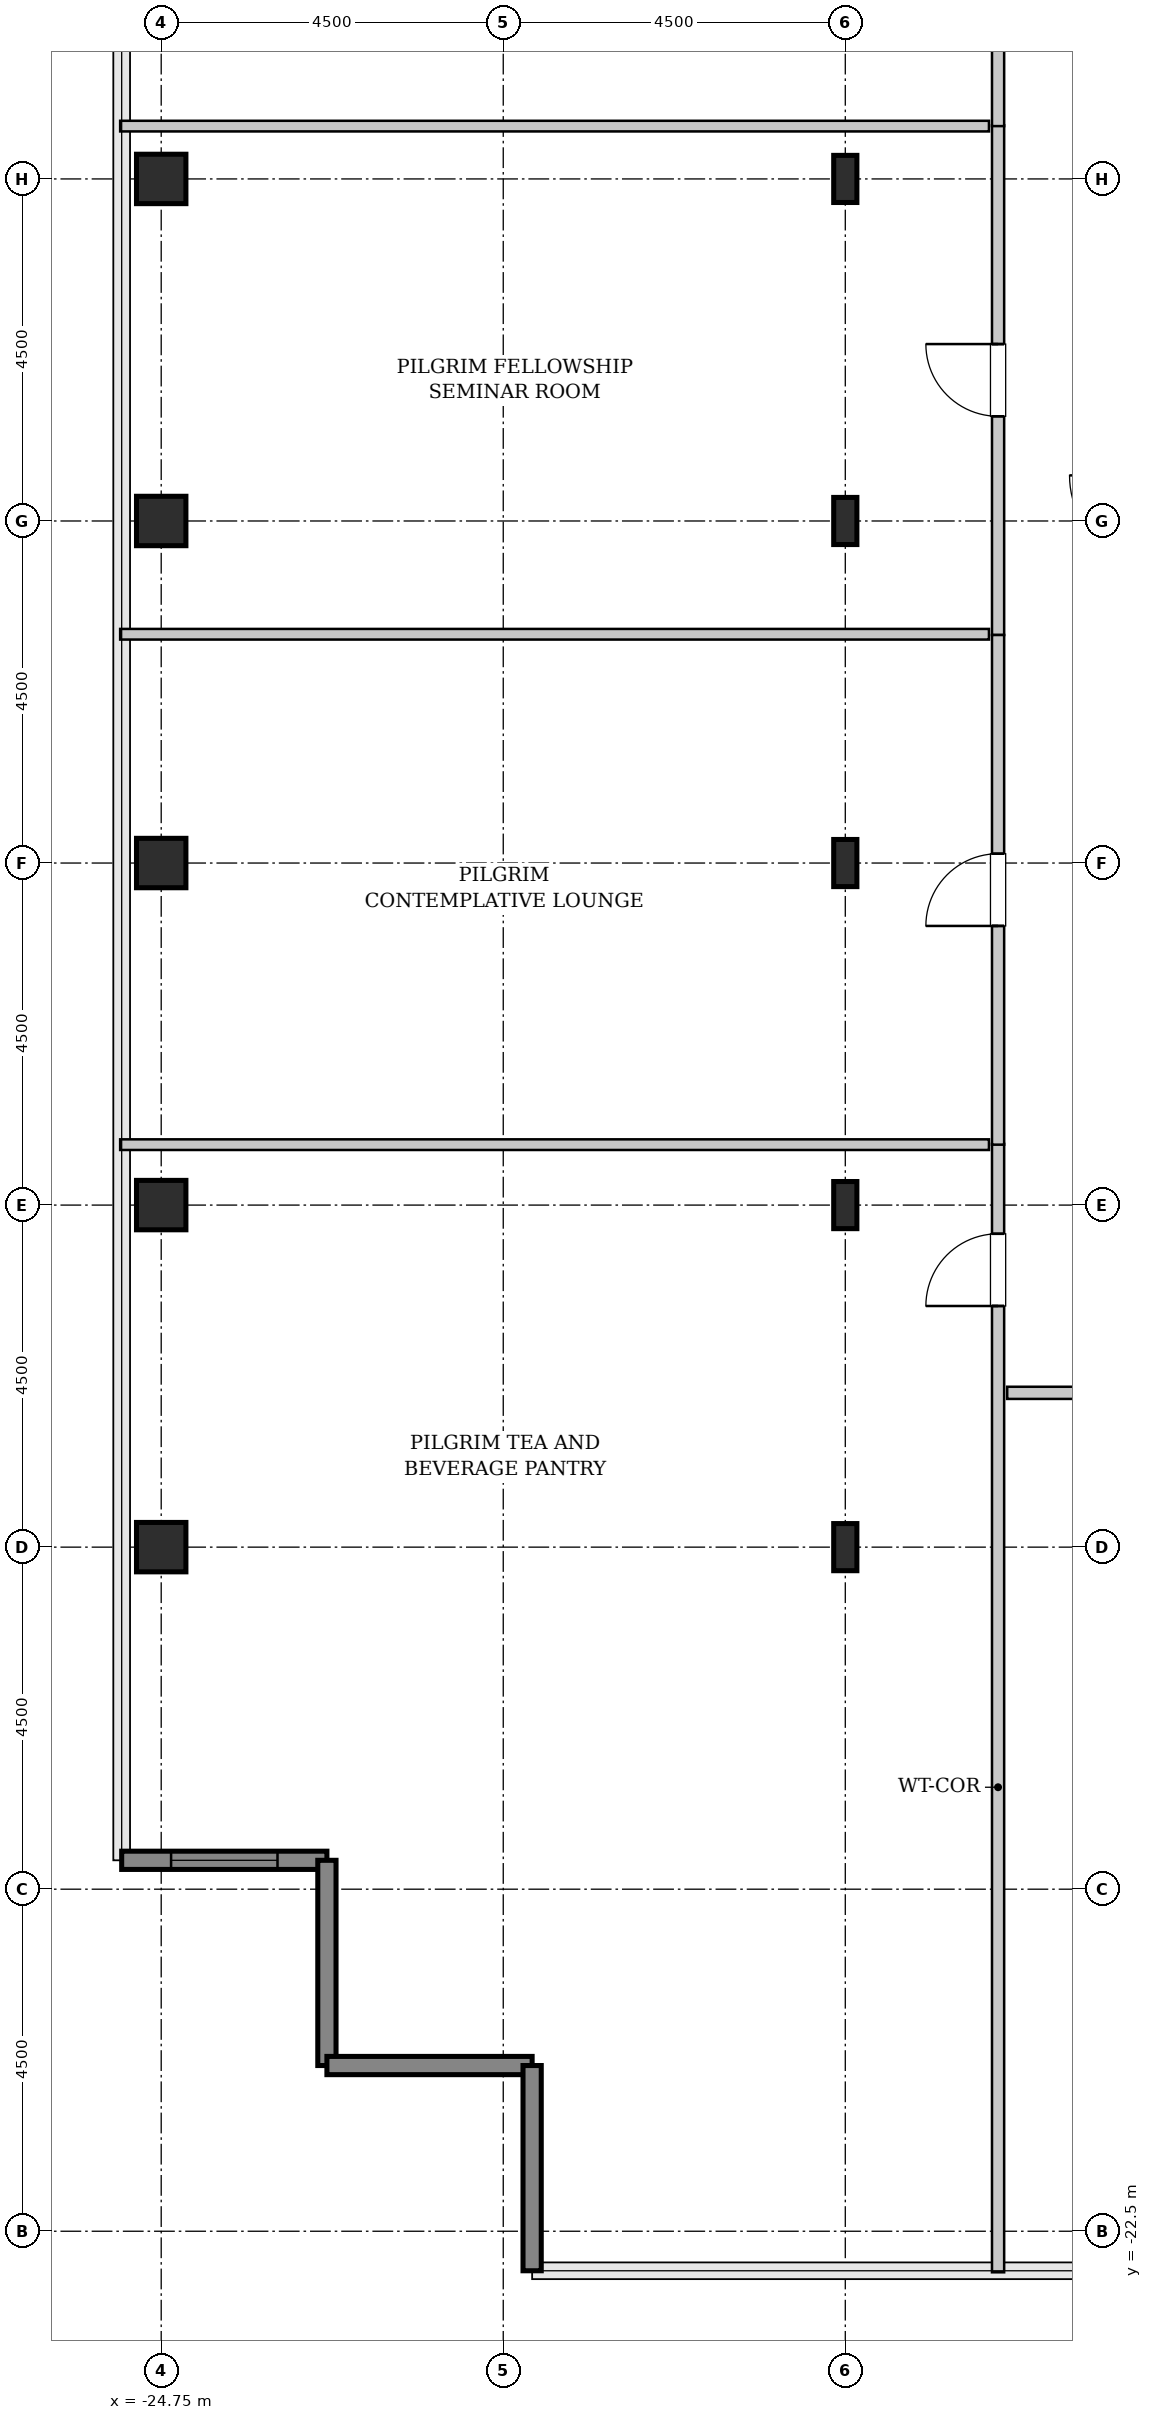
"""IFC4 building model, lengths in metres.
Left out: names, types, materials, properties, quantities, classifications, styles, units other than length and angle.
Written with IfcOpenShell. Run it as: python <this file> out.ifc"""

import sys

from ifc_helpers import new_model, si_unit, direction, frame, frame_2d, origin, origin_2d, place, context, subcontext, project, spatial, rectangle, hollow_rectangle, i_section, extrude, source, transform, mapped, element, fill, save


model = new_model("IFC4")
c1 = context("Model", 3, precision=1e-05, world=origin(), true_north=direction((0.0, 1.0)))
c2 = subcontext(c1, "Body", "Model", "MODEL_VIEW")
j1 = project(units=[si_unit("LENGTHUNIT", "METRE"), si_unit("PLANEANGLEUNIT", "RADIAN")], contexts=[c1])
p1 = place(None, origin())
s1 = spatial("IfcSite", under=j1, at=p1, CompositionType="ELEMENT")
p2 = place(p1, origin())
s2 = spatial("IfcBuilding", under=s1, at=p2, CompositionType="ELEMENT")
p3 = place(p2, frame((0.0, 0.0, 272.2)))
s3 = spatial("IfcBuildingStorey", under=s2, at=p3, CompositionType="ELEMENT", Elevation=272.2)
m1 = source(origin(), c2, "Body", "SweptSolid", [
    extrude(hollow_rectangle(XDim=0.65, YDim=0.65, WallThickness=0.032, InnerFilletRadius=0.032, OuterFilletRadius=0.064, at=origin_2d()), origin(), (0.0, 0.0, 1.0), 3.8),
])
for number, where, z_axis, x_axis in (
    (1, (-24.75, -13.5, 0.0), (0.0, 0.0, 1.0), (1.0, 0.0, 0.0)),
    (2, (-24.75, -9.0, 0.0), (0.0, 0.0, 1.0), (1.0, 0.0, 0.0)),
    (3, (-24.75, -4.5, 0.0), (0.0, 0.0, 1.0), (1.0, 0.0, 0.0)),
    (4, (-24.75, 0.0, 0.0), (0.0, 0.0, 1.0), (1.0, 0.0, 0.0)),
    (5, (-24.75, 4.5, 0.0), (0.0, 0.0, 1.0), (1.0, 0.0, 0.0)),
):
    element("IfcColumn", number, at=place(p3, frame(where, z_axis=z_axis, x_axis=x_axis)), inside=s3, PredefinedType="COLUMN", context=c2, shape_type="MappedRepresentation", body=[
        mapped(m1, transform((0.0, 0.0, 0.0), x_axis=(1.0, 0.0, 0.0), y_axis=(0.0, 1.0, 0.0), z_axis=(0.0, 0.0, 1.0), scale=1.0)),
    ])
m2 = source(origin(), c2, "Body", "SweptSolid", [
    extrude(i_section(OverallWidth=0.305, OverallDepth=0.62, WebThickness=0.021, FlangeThickness=0.04, FilletRadius=0.027, at=origin_2d()), origin(), (0.0, 0.0, 1.0), 3.8),
])
for number, where, z_axis, x_axis in (
    (6, (-15.75, -13.5, 0.0), (0.0, 0.0, 1.0), (1.0, 0.0, 0.0)),
    (7, (-15.75, -9.0, 0.0), (0.0, 0.0, 1.0), (1.0, 0.0, 0.0)),
    (8, (-15.75, -4.5, 0.0), (0.0, 0.0, 1.0), (1.0, 0.0, 0.0)),
    (9, (-15.75, 0.0, 0.0), (0.0, 0.0, 1.0), (1.0, 0.0, 0.0)),
    (10, (-15.75, 4.5, 0.0), (0.0, 0.0, 1.0), (1.0, 0.0, 0.0)),
):
    element("IfcColumn", number, at=place(p3, frame(where, z_axis=z_axis, x_axis=x_axis)), inside=s3, PredefinedType="COLUMN", context=c2, shape_type="MappedRepresentation", body=[
        mapped(m2, transform((0.0, 0.0, 0.0), x_axis=(1.0, 0.0, 0.0), y_axis=(0.0, 1.0, 0.0), z_axis=(0.0, 0.0, 1.0), scale=1.0)),
    ])
m3 = source(origin(), c2, "Body", "SweptSolid", [
    extrude(rectangle(XDim=2.7, YDim=0.24, at=frame_2d((1.35, 0.0))), origin(), (0.0, 0.0, 1.0), 3.55),
])
p4 = place(p3, frame((-25.27, -17.62, 0.0), z_axis=(0.0, 0.0, 1.0), x_axis=(1.0, 0.0, 0.0)))
e11 = element("IfcWall", 11, at=p4, inside=s3, PredefinedType="SHEAR", context=c2, shape_type="MappedRepresentation", body=[
    mapped(m3, transform((0.0, 0.0, 0.0), x_axis=(1.0, 0.0, 0.0), y_axis=(0.0, 1.0, 0.0), z_axis=(0.0, 0.0, 1.0), scale=1.0)),
])
p5 = place(p4, frame((0.65, 0.0, 0.85)))
e12 = element("IfcOpeningElement", 12, at=p5, cuts=e11, PredefinedType="OPENING", context=c2, shape_type="SweptSolid", body=[
    extrude(rectangle(XDim=1.4, YDim=1.8, at=frame_2d((0.7, 0.9))), frame((0.0, 0.13, 0.0), z_axis=(0.0, -1.0, 0.0), x_axis=(1.0, 0.0, 0.0)), (0.0, 0.0, 1.0), 0.26),
])
for number, where, z_axis, x_axis in (
    (13, (-22.57, -17.62, 0.0), (0.0, 0.0, 1.0), (0.0, -1.0, 0.0)),
    (14, (-22.57, -20.32, 0.0), (0.0, 0.0, 1.0), (1.0, 0.0, 0.0)),
    (15, (-19.87, -20.32, 0.0), (0.0, 0.0, 1.0), (0.0, -1.0, 0.0)),
):
    element("IfcWall", number, at=place(p3, frame(where, z_axis=z_axis, x_axis=x_axis)), inside=s3, PredefinedType="SHEAR", context=c2, shape_type="MappedRepresentation", body=[
        mapped(m3, transform((0.0, 0.0, 0.0), x_axis=(1.0, 0.0, 0.0), y_axis=(0.0, 1.0, 0.0), z_axis=(0.0, 0.0, 1.0), scale=1.0)),
    ])
m4 = source(origin(), c2, "Body", "SweptSolid", [
    extrude(rectangle(XDim=14.845, YDim=0.16, at=frame_2d((7.422, 0.0))), origin(), (0.0, 0.0, 1.0), 3.535),
])
p6 = place(p3, frame((-13.74, -23.04, 0.0), z_axis=(0.0, 0.0, 1.0), x_axis=(0.0, 1.0, 0.0)))
e16 = element("IfcWall", 16, at=p6, inside=s3, PredefinedType="PARTITIONING", context=c2, shape_type="MappedRepresentation", body=[
    mapped(m4, transform((0.0, 0.0, 0.0), x_axis=(1.0, 0.0, 0.0), y_axis=(0.0, 1.0, 0.0), z_axis=(0.0, 0.0, 1.0), scale=1.0)),
])
p7 = place(p6, frame((12.712, 0.0, 0.0)))
e17 = element("IfcOpeningElement", 17, at=p7, cuts=e16, PredefinedType="OPENING", context=c2, shape_type="SweptSolid", body=[
    extrude(rectangle(XDim=0.95, YDim=2.1, at=frame_2d((0.475, 1.05))), frame((0.0, 0.09, 0.0), z_axis=(0.0, -1.0, 0.0), x_axis=(1.0, 0.0, 0.0)), (0.0, 0.0, 1.0), 0.18),
])
m5 = source(origin(), c2, "Body", "SweptSolid", [
    extrude(rectangle(XDim=11.43, YDim=0.14, at=frame_2d((5.715, 0.0))), origin(), (0.0, 0.0, 1.0), 3.535),
])
p8 = place(p3, frame((-25.29, -8.205, 0.0), z_axis=(0.0, 0.0, 1.0), x_axis=(1.0, 0.0, 0.0)))
e18 = element("IfcWall", 18, at=p8, inside=s3, PredefinedType="PARTITIONING", context=c2, shape_type="MappedRepresentation", body=[
    mapped(m5, transform((0.0, 0.0, 0.0), x_axis=(1.0, 0.0, 0.0), y_axis=(0.0, 1.0, 0.0), z_axis=(0.0, 0.0, 1.0), scale=1.0)),
])
m6 = source(origin(), c2, "Body", "SweptSolid", [
    extrude(rectangle(XDim=6.705, YDim=0.16, at=frame_2d((3.353, 0.0))), origin(), (0.0, 0.0, 1.0), 3.535),
])
p9 = place(p3, frame((-13.74, -1.5, 0.0), z_axis=(0.0, 0.0, 1.0), x_axis=(0.0, 1.0, 0.0)))
e19 = element("IfcWall", 19, at=p9, inside=s3, PredefinedType="PARTITIONING", context=c2, shape_type="MappedRepresentation", body=[
    mapped(m6, transform((0.0, 0.0, 0.0), x_axis=(1.0, 0.0, 0.0), y_axis=(0.0, 1.0, 0.0), z_axis=(0.0, 0.0, 1.0), scale=1.0)),
])
p10 = place(p9, frame((2.877, 0.0, 0.0)))
e20 = element("IfcOpeningElement", 20, at=p10, cuts=e19, PredefinedType="OPENING", context=c2, shape_type="SweptSolid", body=[
    extrude(rectangle(XDim=0.95, YDim=2.1, at=frame_2d((0.475, 1.05))), frame((0.0, 0.09, 0.0), z_axis=(0.0, -1.0, 0.0), x_axis=(1.0, 0.0, 0.0)), (0.0, 0.0, 1.0), 0.18),
])
for number, where, z_axis, x_axis in (
    (21, (-25.29, 5.195, 0.0), (0.0, 0.0, 1.0), (1.0, 0.0, 0.0)),
    (22, (-25.29, -1.49, 0.0), (0.0, 0.0, 1.0), (1.0, 0.0, 0.0)),
):
    element("IfcWall", number, at=place(p3, frame(where, z_axis=z_axis, x_axis=x_axis)), inside=s3, PredefinedType="PARTITIONING", context=c2, shape_type="MappedRepresentation", body=[
        mapped(m5, transform((0.0, 0.0, 0.0), x_axis=(1.0, 0.0, 0.0), y_axis=(0.0, 1.0, 0.0), z_axis=(0.0, 0.0, 1.0), scale=1.0)),
    ])
p11 = place(p3, frame((-13.74, -8.205, 0.0), z_axis=(0.0, 0.0, 1.0), x_axis=(0.0, 1.0, 0.0)))
e23 = element("IfcWall", 23, at=p11, inside=s3, PredefinedType="PARTITIONING", context=c2, shape_type="MappedRepresentation", body=[
    mapped(m6, transform((0.0, 0.0, 0.0), x_axis=(1.0, 0.0, 0.0), y_axis=(0.0, 1.0, 0.0), z_axis=(0.0, 0.0, 1.0), scale=1.0)),
])
p12 = place(p11, frame((2.877, 0.0, 0.0)))
e24 = element("IfcOpeningElement", 24, at=p12, cuts=e23, PredefinedType="OPENING", context=c2, shape_type="SweptSolid", body=[
    extrude(rectangle(XDim=0.95, YDim=2.1, at=frame_2d((0.475, 1.05))), frame((0.0, 0.09, 0.0), z_axis=(0.0, -1.0, 0.0), x_axis=(1.0, 0.0, 0.0)), (0.0, 0.0, 1.0), 0.18),
])
m7 = source(origin(), c2, "Body", "SweptSolid", [
    extrude(rectangle(XDim=16.045, YDim=0.16, at=frame_2d((8.022, 0.0))), origin(), (0.0, 0.0, 1.0), 3.535),
])
p13 = place(p3, frame((-13.74, 5.195, 0.0), z_axis=(0.0, 0.0, 1.0), x_axis=(0.0, 1.0, 0.0)))
e25 = element("IfcWall", 25, at=p13, inside=s3, PredefinedType="PARTITIONING", context=c2, shape_type="MappedRepresentation", body=[
    mapped(m7, transform((0.0, 0.0, 0.0), x_axis=(1.0, 0.0, 0.0), y_axis=(0.0, 1.0, 0.0), z_axis=(0.0, 0.0, 1.0), scale=1.0)),
])
p14 = place(p13, frame((2.683, 0.0, 0.0)))
e26 = element("IfcOpeningElement", 26, at=p14, cuts=e25, PredefinedType="OPENING", context=c2, shape_type="SweptSolid", body=[
    extrude(rectangle(XDim=0.95, YDim=2.1, at=frame_2d((0.475, 1.05))), frame((0.0, 0.09, 0.0), z_axis=(0.0, -1.0, 0.0), x_axis=(1.0, 0.0, 0.0)), (0.0, 0.0, 1.0), 0.18),
])
m8 = source(origin(), c2, "Body", "SweptSolid", [
    extrude(rectangle(XDim=4.425, YDim=0.16, at=frame_2d((2.212, 0.0))), origin(), (0.0, 0.0, 1.0), 3.535),
])
p15 = place(p3, frame((-13.62, -11.47, 0.0), z_axis=(0.0, 0.0, 1.0), x_axis=(1.0, 0.0, 0.0)))
e27 = element("IfcWall", 27, at=p15, inside=s3, PredefinedType="PARTITIONING", context=c2, shape_type="MappedRepresentation", body=[
    mapped(m8, transform((0.0, 0.0, 0.0), x_axis=(1.0, 0.0, 0.0), y_axis=(0.0, 1.0, 0.0), z_axis=(0.0, 0.0, 1.0), scale=1.0)),
])
p16 = place(p15, frame((1.738, 0.0, 0.0)))
e28 = element("IfcOpeningElement", 28, at=p16, cuts=e27, PredefinedType="OPENING", context=c2, shape_type="SweptSolid", body=[
    extrude(rectangle(XDim=0.95, YDim=2.1, at=frame_2d((0.475, 1.05))), frame((0.0, 0.09, 0.0), z_axis=(0.0, -1.0, 0.0), x_axis=(1.0, 0.0, 0.0)), (0.0, 0.0, 1.0), 0.18),
])
m9 = source(origin(), c2, "Body", "SweptSolid", [
    extrude(rectangle(XDim=1.4, YDim=1.8, at=frame_2d((0.7, 0.9))), frame((0.0, 0.03, 0.0), z_axis=(0.0, -1.0, 0.0), x_axis=(1.0, 0.0, 0.0)), (0.0, 0.0, 1.0), 0.06),
])
p17 = place(p5, origin())
e29 = element("IfcWindow", 29, at=p17, inside=s3, PartitioningType="SINGLE_PANEL", PredefinedType="WINDOW", context=c2, shape_type="MappedRepresentation", body=[
    mapped(m9, transform((0.0, 0.0, 0.0), x_axis=(1.0, 0.0, 0.0), y_axis=(0.0, 1.0, 0.0), z_axis=(0.0, 0.0, 1.0), scale=1.0)),
])
fill(e12, e29)
m10 = source(origin(), c2, "Body", "SweptSolid", [
    extrude(rectangle(XDim=0.95, YDim=2.1, at=frame_2d((0.475, 1.05))), frame((0.0, 0.025, 0.0), z_axis=(0.0, -1.0, 0.0), x_axis=(1.0, 0.0, 0.0)), (0.0, 0.0, 1.0), 0.05),
])
p18 = place(p7, origin())
e30 = element("IfcDoor", 30, at=p18, inside=s3, OperationType="SINGLE_SWING_LEFT", PredefinedType="DOOR", context=c2, shape_type="MappedRepresentation", body=[
    mapped(m10, transform((0.0, 0.0, 0.0), x_axis=(1.0, 0.0, 0.0), y_axis=(0.0, 1.0, 0.0), z_axis=(0.0, 0.0, 1.0), scale=1.0)),
])
fill(e17, e30)
p19 = place(p10, origin())
e31 = element("IfcDoor", 31, at=p19, inside=s3, OperationType="SINGLE_SWING_RIGHT", PredefinedType="DOOR", context=c2, shape_type="MappedRepresentation", body=[
    mapped(m10, transform((0.0, 0.0, 0.0), x_axis=(1.0, 0.0, 0.0), y_axis=(0.0, 1.0, 0.0), z_axis=(0.0, 0.0, 1.0), scale=1.0)),
])
fill(e20, e31)
p20 = place(p12, origin())
e32 = element("IfcDoor", 32, at=p20, inside=s3, OperationType="SINGLE_SWING_LEFT", PredefinedType="DOOR", context=c2, shape_type="MappedRepresentation", body=[
    mapped(m10, transform((0.0, 0.0, 0.0), x_axis=(1.0, 0.0, 0.0), y_axis=(0.0, 1.0, 0.0), z_axis=(0.0, 0.0, 1.0), scale=1.0)),
])
fill(e24, e32)
save(model, sys.argv[1])
